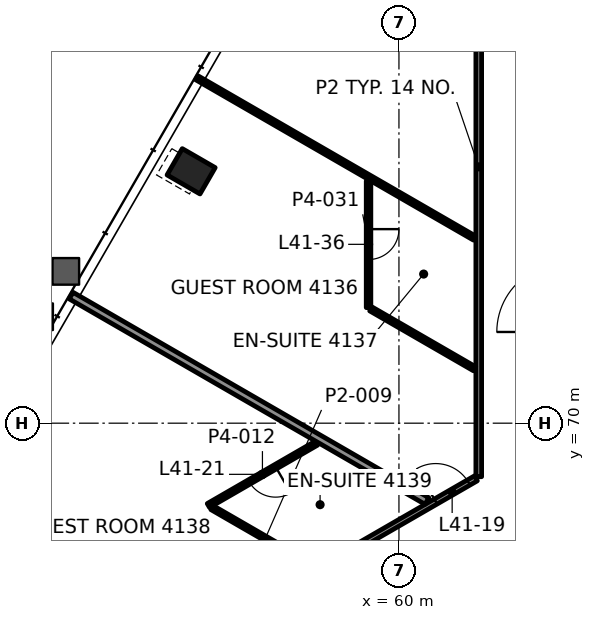
"""IFC4 building model, lengths in metres.
Left out: names, types, materials, properties, quantities, classifications, styles, units other than length and angle.
Written with IfcOpenShell. Run it as: python <this file> out.ifc"""

import sys

from ifc_helpers import new_model, si_unit, direction, frame, frame_2d, origin, origin_2d, place, context, subcontext, project, spatial, rectangle, hollow_rectangle, extrude, element, fill, save


model = new_model("IFC4")
c1 = context("Model", 3, precision=1e-05, world=origin(), true_north=direction((0.0, 1.0)))
c2 = subcontext(c1, "Body", "Model", "MODEL_VIEW")
j1 = project(units=[si_unit("LENGTHUNIT", "METRE"), si_unit("PLANEANGLEUNIT", "RADIAN")], contexts=[c1])
p1 = place(None, origin())
s1 = spatial("IfcSite", under=j1, at=p1, CompositionType="ELEMENT")
p2 = place(p1, origin())
s2 = spatial("IfcBuilding", under=s1, at=p2, CompositionType="ELEMENT")
p3 = place(p2, frame((0.0, 0.0, 179.2)))
s3 = spatial("IfcBuildingStorey", under=s2, at=p3, CompositionType="ELEMENT", Elevation=179.2)
p4 = place(p3, frame((54.532, 76.628, -0.0), z_axis=(0.0, 0.0, 1.0), x_axis=(-0.5, -0.866025403784, 0.0)))
e1 = element("IfcColumn", 1, at=p4, inside=s3, PredefinedType="COLUMN", context=c2, shape_type="SweptSolid", body=[
    extrude(hollow_rectangle(XDim=0.8, YDim=1.0, WallThickness=0.05, at=origin_2d()), origin(), (0.0, 0.0, 1.0), 3.9),
])
p5 = place(p3, frame((49.05, 61.057, 0.0), z_axis=(0.0, 0.0, 1.0), x_axis=(0.866027379905, 0.499996577244, 0.0)))
e2 = element("IfcWall", 2, at=p5, inside=s3, PredefinedType="PARTITIONING", context=c2, shape_type="SweptSolid", body=[
    extrude(rectangle(XDim=14.982, YDim=0.15, at=frame_2d((7.491, 0.0))), origin(), (0.0, 0.0, 1.0), 3.1),
])
p6 = place(p5, frame((0.532, 0.0, 0.0)))
e3 = element("IfcOpeningElement", 3, at=p6, cuts=e2, PredefinedType="OPENING", context=c2, shape_type="SweptSolid", body=[
    extrude(rectangle(XDim=1.0, YDim=2.1, at=frame_2d((0.5, 1.05))), frame((0.0, 0.085, 0.0), z_axis=(0.0, -1.0, 0.0), x_axis=(1.0, 0.0, 0.0)), (0.0, 0.0, 1.0), 0.17),
])
p7 = place(p5, frame((8.725, 0.0, 0.0)))
e4 = element("IfcOpeningElement", 4, at=p7, cuts=e2, PredefinedType="OPENING", context=c2, shape_type="SweptSolid", body=[
    extrude(rectangle(XDim=1.0, YDim=2.1, at=frame_2d((0.5, 1.05))), frame((0.0, 0.085, 0.0), z_axis=(0.0, -1.0, 0.0), x_axis=(1.0, 0.0, 0.0)), (0.0, 0.0, 1.0), 0.17),
])
p8 = place(p5, frame((13.76, 0.0, 0.0)))
e5 = element("IfcOpeningElement", 5, at=p8, cuts=e2, PredefinedType="OPENING", context=c2, shape_type="SweptSolid", body=[
    extrude(rectangle(XDim=1.0, YDim=2.1, at=frame_2d((0.5, 1.05))), frame((0.0, 0.085, 0.0), z_axis=(0.0, -1.0, 0.0), x_axis=(1.0, 0.0, 0.0)), (0.0, 0.0, 1.0), 0.17),
])
p9 = place(p3, frame((57.83, 69.475, 0.0), z_axis=(0.0, 0.0, 1.0), x_axis=(-0.866038236991, -0.499977771575, 0.0)))
e6 = element("IfcWall", 6, at=p9, inside=s3, PredefinedType="PARTITIONING", context=c2, shape_type="SweptSolid", body=[
    extrude(rectangle(XDim=3.283, YDim=0.12, at=frame_2d((1.642, 0.0))), origin(), (0.0, 0.0, 1.0), 3.1),
])
p10 = place(p9, frame((1.242, 0.0, 0.0)))
e7 = element("IfcOpeningElement", 7, at=p10, cuts=e6, PredefinedType="OPENING", context=c2, shape_type="SweptSolid", body=[
    extrude(rectangle(XDim=0.8, YDim=2.1, at=frame_2d((0.4, 1.05))), frame((0.0, 0.07, 0.0), z_axis=(0.0, -1.0, 0.0), x_axis=(1.0, 0.0, 0.0)), (0.0, 0.0, 1.0), 0.14),
])
p11 = place(p3, frame((62.1, 68.591, 0.0), z_axis=(0.0, 0.0, 1.0), x_axis=(0.0, 1.0, 0.0)))
e8 = element("IfcWall", 8, at=p11, inside=s3, PredefinedType="PARTITIONING", context=c2, shape_type="SweptSolid", body=[
    extrude(rectangle(XDim=16.308, YDim=0.15, at=frame_2d((8.154, 0.0))), origin(), (0.0, 0.0, 1.0), 3.1),
])
p12 = place(p3, frame((59.2, 76.371, 0.0), z_axis=(0.0, 0.0, 1.0), x_axis=(0.0, -1.0, 0.0)))
e9 = element("IfcWall", 9, at=p12, inside=s3, PredefinedType="PARTITIONING", context=c2, shape_type="SweptSolid", body=[
    extrude(rectangle(XDim=3.329, YDim=0.12, at=frame_2d((1.665, 0.0))), origin(), (0.0, 0.0, 1.0), 3.1),
])
p13 = place(p12, frame((1.265, 0.0, 0.0)))
e10 = element("IfcOpeningElement", 10, at=p13, cuts=e9, PredefinedType="OPENING", context=c2, shape_type="SweptSolid", body=[
    extrude(rectangle(XDim=0.8, YDim=2.1, at=frame_2d((0.4, 1.05))), frame((0.0, 0.07, 0.0), z_axis=(0.0, -1.0, 0.0), x_axis=(1.0, 0.0, 0.0)), (0.0, 0.0, 1.0), 0.14),
])
p14 = place(p3, frame((61.99, 74.869, 0.0), z_axis=(0.0, 0.0, 1.0), x_axis=(-0.866017924271, 0.500012954673, 0.0)))
e11 = element("IfcWall", 11, at=p14, inside=s3, PredefinedType="PARTITIONING", context=c2, shape_type="SweptSolid", body=[
    extrude(rectangle(XDim=8.439, YDim=0.12, at=frame_2d((4.219, 0.0))), origin(), (0.0, 0.0, 1.0), 3.022),
])
p15 = place(p3, frame((61.99, 71.431, 0.0), z_axis=(0.0, 0.0, 1.0), x_axis=(-0.866028267601, 0.499995039691, 0.0)))
e12 = element("IfcWall", 12, at=p15, inside=s3, PredefinedType="PARTITIONING", context=c2, shape_type="SweptSolid", body=[
    extrude(rectangle(XDim=3.153, YDim=0.12, at=frame_2d((1.576, 0.0))), origin(), (0.0, 0.0, 1.0), 3.1),
])
p16 = place(p3, frame((60.737, 67.951, 0.0), z_axis=(0.0, 0.0, 1.0), x_axis=(-0.866033683985, 0.499985657998, 0.0)))
e13 = element("IfcWall", 13, at=p16, inside=s3, PredefinedType="PARTITIONING", context=c2, shape_type="SweptSolid", body=[
    extrude(rectangle(XDim=10.813, YDim=0.2, at=frame_2d((5.406, 0.0))), origin(), (0.0, 0.0, 1.0), 3.022),
])
p17 = place(p3, frame((57.776, 66.222, 0.0), z_axis=(0.0, 0.0, 1.0), x_axis=(-0.866009247561, 0.500027982357, 0.0)))
e14 = element("IfcWall", 14, at=p17, inside=s3, PredefinedType="PARTITIONING", context=c2, shape_type="SweptSolid", body=[
    extrude(rectangle(XDim=3.113, YDim=0.12, at=frame_2d((1.556, 0.0))), origin(), (0.0, 0.0, 1.0), 3.1),
])
p18 = place(p3, frame((54.119, 64.13, 0.0), z_axis=(0.0, 0.0, 1.0), x_axis=(-0.866016957496, 0.500014629116, 0.0)))
e15 = element("IfcWall", 15, at=p18, inside=s3, PredefinedType="PARTITIONING", context=c2, shape_type="SweptSolid", body=[
    extrude(rectangle(XDim=6.992, YDim=0.2, at=frame_2d((3.496, 0.0))), origin(), (0.0, 0.0, 1.0), 3.1),
])
p19 = place(p8, origin())
e16 = element("IfcDoor", 16, at=p19, inside=s3, OperationType="SINGLE_SWING_LEFT", PredefinedType="DOOR", context=c2, shape_type="SweptSolid", body=[
    extrude(rectangle(XDim=1.0, YDim=2.1, at=frame_2d((0.5, 1.05))), frame((0.0, 0.025, 0.0), z_axis=(0.0, -1.0, 0.0), x_axis=(1.0, 0.0, 0.0)), (0.0, 0.0, 1.0), 0.05),
])
fill(e5, e16)
p20 = place(p10, origin())
e17 = element("IfcDoor", 17, at=p20, inside=s3, OperationType="SINGLE_SWING_LEFT", PredefinedType="DOOR", context=c2, shape_type="SweptSolid", body=[
    extrude(rectangle(XDim=0.8, YDim=2.1, at=frame_2d((0.4, 1.05))), frame((0.0, 0.025, 0.0), z_axis=(0.0, -1.0, 0.0), x_axis=(1.0, 0.0, 0.0)), (0.0, 0.0, 1.0), 0.05),
])
fill(e7, e17)
p21 = place(p13, origin())
e18 = element("IfcDoor", 18, at=p21, inside=s3, OperationType="SINGLE_SWING_LEFT", PredefinedType="DOOR", context=c2, shape_type="SweptSolid", body=[
    extrude(rectangle(XDim=0.8, YDim=2.1, at=frame_2d((0.4, 1.05))), frame((0.0, 0.025, 0.0), z_axis=(0.0, -1.0, 0.0), x_axis=(1.0, 0.0, 0.0)), (0.0, 0.0, 1.0), 0.05),
])
fill(e10, e18)
save(model, sys.argv[1])
